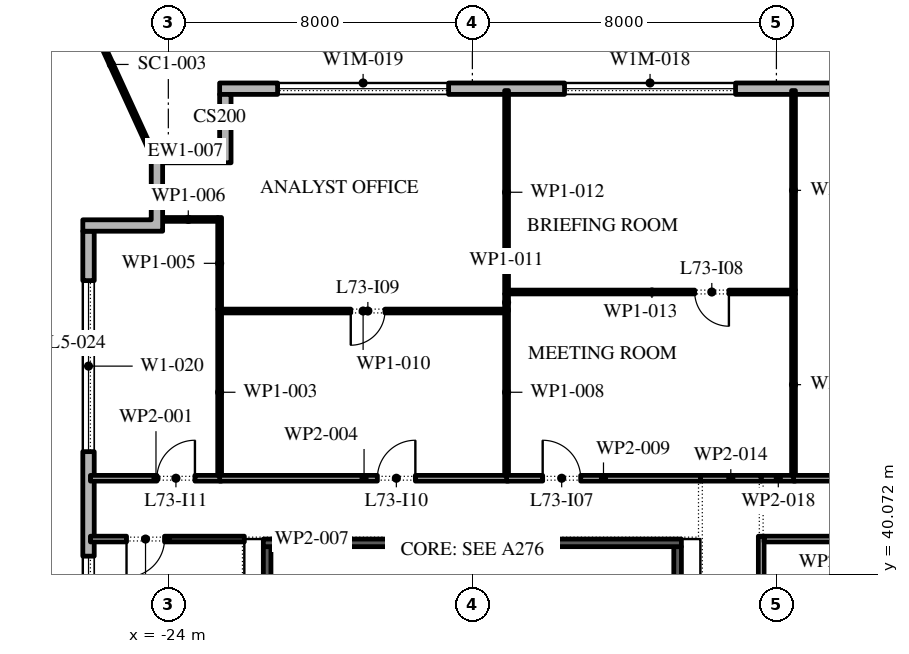
"""IFC4 building model, lengths in metres.
Left out: names, types, materials, properties, quantities, classifications, styles, units other than length and angle.
Written with IfcOpenShell. Run it as: python <this file> out.ifc"""

import sys

from ifc_helpers import new_model, si_unit, direction, frame, frame_2d, origin, place, context, subcontext, project, spatial, polyline, rectangle, outline, extrude, element, fill, save


model = new_model("IFC4")
c1 = context("Model", 3, precision=1e-05, world=origin(), true_north=direction((0.0, 1.0)))
c2 = subcontext(c1, "Body", "Model", "MODEL_VIEW")
j1 = project(units=[si_unit("LENGTHUNIT", "METRE"), si_unit("PLANEANGLEUNIT", "RADIAN")], contexts=[c1])
p1 = place(None, origin())
s1 = spatial("IfcSite", under=j1, at=p1, CompositionType="ELEMENT")
p2 = place(p1, origin())
s2 = spatial("IfcBuilding", under=s1, at=p2, CompositionType="ELEMENT")
p3 = place(p2, frame((0.0, 0.0, 334.2)))
s3 = spatial("IfcBuildingStorey", under=s2, at=p3, CompositionType="ELEMENT", Elevation=334.2)
p4 = place(p3, frame((22.35, 52.85, 0.0), z_axis=(0.0, 0.0, 1.0), x_axis=(-1.0, 0.0, 0.0)))
e1 = element("IfcWall", 1, at=p4, inside=s3, PredefinedType="STANDARD", context=c2, shape_type="SweptSolid", body=[
    extrude(rectangle(XDim=45.0, YDim=0.3, at=frame_2d((22.5, 0.0))), origin(), (0.0, 0.0, 1.0), 4.0),
])
p5 = place(p4, frame((1.375, 0.0, 0.45)))
e2 = element("IfcOpeningElement", 2, at=p5, cuts=e1, PredefinedType="OPENING", context=c2, shape_type="SweptSolid", body=[
    extrude(rectangle(XDim=4.5, YDim=2.575, at=frame_2d((2.25, 1.288))), frame((0.0, 0.16, 0.0), z_axis=(0.0, -1.0, 0.0), x_axis=(1.0, 0.0, 0.0)), (0.0, 0.0, 1.0), 0.32),
])
p6 = place(p4, frame((8.775, 0.0, 0.45)))
e3 = element("IfcOpeningElement", 3, at=p6, cuts=e1, PredefinedType="OPENING", context=c2, shape_type="SweptSolid", body=[
    extrude(rectangle(XDim=4.5, YDim=2.575, at=frame_2d((2.25, 1.288))), frame((0.0, 0.16, 0.0), z_axis=(0.0, -1.0, 0.0), x_axis=(1.0, 0.0, 0.0)), (0.0, 0.0, 1.0), 0.32),
])
p7 = place(p4, frame((17.375, 0.0, 0.0)))
e4 = element("IfcOpeningElement", 4, at=p7, cuts=e1, PredefinedType="OPENING", context=c2, shape_type="SweptSolid", body=[
    extrude(rectangle(XDim=2.4, YDim=3.025, at=frame_2d((1.2, 1.512))), frame((0.0, 0.16, 0.0), z_axis=(0.0, -1.0, 0.0), x_axis=(1.0, 0.0, 0.0)), (0.0, 0.0, 1.0), 0.32),
])
p8 = place(p4, frame((23.875, 0.0, 0.45)))
e5 = element("IfcOpeningElement", 5, at=p8, cuts=e1, PredefinedType="OPENING", context=c2, shape_type="SweptSolid", body=[
    extrude(rectangle(XDim=4.5, YDim=2.575, at=frame_2d((2.25, 1.288))), frame((0.0, 0.16, 0.0), z_axis=(0.0, -1.0, 0.0), x_axis=(1.0, 0.0, 0.0)), (0.0, 0.0, 1.0), 0.32),
])
p9 = place(p4, frame((31.425, 0.0, 0.45)))
e6 = element("IfcOpeningElement", 6, at=p9, cuts=e1, PredefinedType="OPENING", context=c2, shape_type="SweptSolid", body=[
    extrude(rectangle(XDim=4.5, YDim=2.575, at=frame_2d((2.25, 1.288))), frame((0.0, 0.16, 0.0), z_axis=(0.0, -1.0, 0.0), x_axis=(1.0, 0.0, 0.0)), (0.0, 0.0, 1.0), 0.32),
])
p10 = place(p4, frame((38.975, 0.0, 0.45)))
e7 = element("IfcOpeningElement", 7, at=p10, cuts=e1, PredefinedType="OPENING", context=c2, shape_type="SweptSolid", body=[
    extrude(rectangle(XDim=4.5, YDim=2.575, at=frame_2d((2.25, 1.288))), frame((0.0, 0.16, 0.0), z_axis=(0.0, -1.0, 0.0), x_axis=(1.0, 0.0, 0.0)), (0.0, 0.0, 1.0), 0.32),
])
p11 = place(p3, frame((-26.1, 49.1, 0.0), z_axis=(0.0, 0.0, 1.0), x_axis=(0.0, -1.0, 0.0)))
e8 = element("IfcWall", 8, at=p11, inside=s3, PredefinedType="STANDARD", context=c2, shape_type="SweptSolid", body=[
    extrude(rectangle(XDim=51.5, YDim=0.3, at=frame_2d((25.75, 0.0))), origin(), (0.0, 0.0, 1.0), 4.0),
])
p12 = place(p11, frame((1.3, 0.0, 0.45)))
e9 = element("IfcOpeningElement", 9, at=p12, cuts=e8, PredefinedType="OPENING", context=c2, shape_type="SweptSolid", body=[
    extrude(rectangle(XDim=4.5, YDim=3.05, at=frame_2d((2.25, 1.525))), frame((0.0, 0.16, 0.0), z_axis=(0.0, -1.0, 0.0), x_axis=(1.0, 0.0, 0.0)), (0.0, 0.0, 1.0), 0.32),
])
p13 = place(p11, frame((8.55, 0.0, 0.45)))
e10 = element("IfcOpeningElement", 10, at=p13, cuts=e8, PredefinedType="OPENING", context=c2, shape_type="SweptSolid", body=[
    extrude(rectangle(XDim=4.5, YDim=3.05, at=frame_2d((2.25, 1.525))), frame((0.0, 0.16, 0.0), z_axis=(0.0, -1.0, 0.0), x_axis=(1.0, 0.0, 0.0)), (0.0, 0.0, 1.0), 0.32),
])
p14 = place(p11, frame((17.0, 0.0, 0.0)))
e11 = element("IfcOpeningElement", 11, at=p14, cuts=e8, PredefinedType="OPENING", context=c2, shape_type="SweptSolid", body=[
    extrude(rectangle(XDim=2.4, YDim=3.5, at=frame_2d((1.2, 1.75))), frame((0.0, 0.16, 0.0), z_axis=(0.0, -1.0, 0.0), x_axis=(1.0, 0.0, 0.0)), (0.0, 0.0, 1.0), 0.32),
])
p15 = place(p11, frame((23.35, 0.0, 0.45)))
e12 = element("IfcOpeningElement", 12, at=p15, cuts=e8, PredefinedType="OPENING", context=c2, shape_type="SweptSolid", body=[
    extrude(rectangle(XDim=4.5, YDim=3.05, at=frame_2d((2.25, 1.525))), frame((0.0, 0.16, 0.0), z_axis=(0.0, -1.0, 0.0), x_axis=(1.0, 0.0, 0.0)), (0.0, 0.0, 1.0), 0.32),
])
p16 = place(p11, frame((30.75, 0.0, 0.45)))
e13 = element("IfcOpeningElement", 13, at=p16, cuts=e8, PredefinedType="OPENING", context=c2, shape_type="SweptSolid", body=[
    extrude(rectangle(XDim=4.5, YDim=3.05, at=frame_2d((2.25, 1.525))), frame((0.0, 0.16, 0.0), z_axis=(0.0, -1.0, 0.0), x_axis=(1.0, 0.0, 0.0)), (0.0, 0.0, 1.0), 0.32),
])
p17 = place(p11, frame((38.15, 0.0, 0.45)))
e14 = element("IfcOpeningElement", 14, at=p17, cuts=e8, PredefinedType="OPENING", context=c2, shape_type="SweptSolid", body=[
    extrude(rectangle(XDim=4.5, YDim=3.05, at=frame_2d((2.25, 1.525))), frame((0.0, 0.16, 0.0), z_axis=(0.0, -1.0, 0.0), x_axis=(1.0, 0.0, 0.0)), (0.0, 0.0, 1.0), 0.32),
])
p18 = place(p11, frame((46.6, 0.0, 0.0)))
e15 = element("IfcOpeningElement", 15, at=p18, cuts=e8, PredefinedType="OPENING", context=c2, shape_type="SweptSolid", body=[
    extrude(rectangle(XDim=2.4, YDim=3.5, at=frame_2d((1.2, 1.75))), frame((0.0, 0.16, 0.0), z_axis=(0.0, -1.0, 0.0), x_axis=(1.0, 0.0, 0.0)), (0.0, 0.0, 1.0), 0.32),
])
p19 = place(p3, origin())
e16 = element("IfcWall", 16, at=p19, inside=s3, PredefinedType="STANDARD", context=c2, shape_type="SweptSolid", body=[
    extrude(outline(polyline([(-24.45, 49.4), (-24.45, 51.2), (-22.65, 51.2), (-22.65, 52.7), (-22.35, 52.7), (-22.35, 50.9), (-24.15, 50.9), (-24.15, 49.1), (-26.25, 49.1), (-26.25, 49.4), (-24.45, 49.4)])), origin(), (0.0, 0.0, 1.0), 4.0),
])
p20 = place(p3, frame((-24.45, 51.2, -0.05), z_axis=(0.0, 0.0, 1.0), x_axis=(-0.41666974254, 0.909057933056, 0.0)))
e17 = element("IfcWall", 17, at=p20, inside=s3, PredefinedType="STANDARD", context=c2, shape_type="SweptSolid", body=[
    extrude(rectangle(XDim=5.033, YDim=0.1, at=frame_2d((2.517, 0.0))), origin(), (0.0, 0.0, 1.0), 4.05),
])
p21 = place(p3, frame((-21.4, 25.75, 0.0), z_axis=(0.0, 0.0, 1.0), x_axis=(0.0, 1.0, 0.0)))
e18 = element("IfcWall", 18, at=p21, inside=s3, PredefinedType="SHEAR", context=c2, shape_type="SweptSolid", body=[
    extrude(rectangle(XDim=15.05, YDim=0.2, at=frame_2d((7.525, 0.0))), origin(), (0.0, 0.0, 1.0), 4.0),
])
p22 = place(p3, frame((-10.6, 25.75, 0.0), z_axis=(0.0, 0.0, 1.0), x_axis=(0.0, 1.0, 0.0)))
e19 = element("IfcWall", 19, at=p22, inside=s3, PredefinedType="SHEAR", context=c2, shape_type="SweptSolid", body=[
    extrude(rectangle(XDim=15.05, YDim=0.2, at=frame_2d((7.525, 0.0))), origin(), (0.0, 0.0, 1.0), 4.0),
])
p23 = place(p22, frame((7.075, 0.0, 0.0)))
e20 = element("IfcOpeningElement", 20, at=p23, cuts=e19, PredefinedType="OPENING", context=c2, shape_type="SweptSolid", body=[
    extrude(rectangle(XDim=0.9, YDim=2.1, at=frame_2d((0.45, 1.05))), frame((0.0, 0.11, 0.0), z_axis=(0.0, -1.0, 0.0), x_axis=(1.0, 0.0, 0.0)), (0.0, 0.0, 1.0), 0.22),
])
p24 = place(p3, frame((-21.5, 40.9, 0.0), z_axis=(0.0, 0.0, 1.0), x_axis=(1.0, 0.0, 0.0)))
e21 = element("IfcWall", 21, at=p24, inside=s3, PredefinedType="SHEAR", context=c2, shape_type="SweptSolid", body=[
    extrude(rectangle(XDim=11.0, YDim=0.2, at=frame_2d((5.5, 0.0))), origin(), (0.0, 0.0, 1.0), 4.0),
])
p25 = place(p3, frame((-26.05, 42.6, 0.0), z_axis=(0.0, 0.0, 1.0), x_axis=(1.0, 0.0, 0.0)))
e22 = element("IfcWall", 22, at=p25, inside=s3, PredefinedType="PARTITIONING", context=c2, shape_type="SweptSolid", body=[
    extrude(rectangle(XDim=3.45, YDim=0.15, at=frame_2d((1.725, 0.0))), origin(), (0.0, 0.0, 1.0), 4.0),
])
p26 = place(p25, frame((1.75, 0.0, 0.0)))
e23 = element("IfcOpeningElement", 23, at=p26, cuts=e22, PredefinedType="OPENING", context=c2, shape_type="SweptSolid", body=[
    extrude(rectangle(XDim=1.0, YDim=2.1, at=frame_2d((0.5, 1.05))), frame((0.0, 0.085, 0.0), z_axis=(0.0, -1.0, 0.0), x_axis=(1.0, 0.0, 0.0)), (0.0, 0.0, 1.0), 0.17),
])
p27 = place(p3, frame((-22.65, 42.675, 0.0), z_axis=(0.0, 0.0, 1.0), x_axis=(0.0, 1.0, 0.0)))
e24 = element("IfcWall", 24, at=p27, inside=s3, PredefinedType="PARTITIONING", context=c2, shape_type="SweptSolid", body=[
    extrude(rectangle(XDim=4.375, YDim=0.1, at=frame_2d((2.188, 0.0))), origin(), (0.0, 0.0, 1.0), 4.0),
])
p28 = place(p3, frame((-22.65, 42.6, 0.0), z_axis=(0.0, 0.0, 1.0), x_axis=(1.0, 0.0, 0.0)))
e25 = element("IfcWall", 25, at=p28, inside=s3, PredefinedType="PARTITIONING", context=c2, shape_type="SweptSolid", body=[
    extrude(rectangle(XDim=7.6, YDim=0.15, at=frame_2d((3.8, 0.0))), origin(), (0.0, 0.0, 1.0), 4.0),
])
p29 = place(p28, frame((4.15, 0.0, 0.0)))
e26 = element("IfcOpeningElement", 26, at=p29, cuts=e25, PredefinedType="OPENING", context=c2, shape_type="SweptSolid", body=[
    extrude(rectangle(XDim=1.0, YDim=2.1, at=frame_2d((0.5, 1.05))), frame((0.0, 0.085, 0.0), z_axis=(0.0, -1.0, 0.0), x_axis=(1.0, 0.0, 0.0)), (0.0, 0.0, 1.0), 0.17),
])
p30 = place(p3, frame((-22.65, 47.05, 0.0), z_axis=(0.0, 0.0, 1.0), x_axis=(0.0, 1.0, 0.0)))
e27 = element("IfcWall", 27, at=p30, inside=s3, PredefinedType="PARTITIONING", context=c2, shape_type="SweptSolid", body=[
    extrude(rectangle(XDim=2.41, YDim=0.1, at=frame_2d((1.205, 0.0))), origin(), (0.0, 0.0, 1.0), 4.0),
])
p31 = place(p3, frame((-22.7, 49.41, 0.0), z_axis=(0.0, 0.0, 1.0), x_axis=(-1.0, 0.0, 0.0)))
e28 = element("IfcWall", 28, at=p31, inside=s3, PredefinedType="PARTITIONING", context=c2, shape_type="SweptSolid", body=[
    extrude(rectangle(XDim=1.55, YDim=0.1, at=frame_2d((0.775, 0.0))), origin(), (0.0, 0.0, 1.0), 4.0),
])
p32 = place(p3, frame((-22.0, 41.0, 0.0), z_axis=(0.0, 0.0, 1.0), x_axis=(-1.0, 0.0, 0.0)))
e29 = element("IfcWall", 29, at=p32, inside=s3, PredefinedType="PARTITIONING", context=c2, shape_type="SweptSolid", body=[
    extrude(rectangle(XDim=4.05, YDim=0.15, at=frame_2d((2.025, 0.0))), origin(), (0.0, 0.0, 1.0), 4.0),
])
p33 = place(p32, frame((2.1, 0.0, 0.0)))
e30 = element("IfcOpeningElement", 30, at=p33, cuts=e29, PredefinedType="OPENING", context=c2, shape_type="SweptSolid", body=[
    extrude(rectangle(XDim=1.0, YDim=2.1, at=frame_2d((0.5, 1.05))), frame((0.0, 0.085, 0.0), z_axis=(0.0, -1.0, 0.0), x_axis=(1.0, 0.0, 0.0)), (0.0, 0.0, 1.0), 0.17),
])
p34 = place(p3, frame((-15.1, 42.675, 0.0), z_axis=(0.0, 0.0, 1.0), x_axis=(0.0, 1.0, 0.0)))
e31 = element("IfcWall", 31, at=p34, inside=s3, PredefinedType="PARTITIONING", context=c2, shape_type="SweptSolid", body=[
    extrude(rectangle(XDim=4.375, YDim=0.1, at=frame_2d((2.188, 0.0))), origin(), (0.0, 0.0, 1.0), 4.0),
])
p35 = place(p3, frame((-15.1, 42.6, 0.0), z_axis=(0.0, 0.0, 1.0), x_axis=(1.0, 0.0, 0.0)))
e32 = element("IfcWall", 32, at=p35, inside=s3, PredefinedType="PARTITIONING", context=c2, shape_type="SweptSolid", body=[
    extrude(rectangle(XDim=5.1, YDim=0.15, at=frame_2d((2.55, 0.0))), origin(), (0.0, 0.0, 1.0), 4.0),
])
p36 = place(p35, frame((0.95, 0.0, 0.0)))
e33 = element("IfcOpeningElement", 33, at=p36, cuts=e32, PredefinedType="OPENING", context=c2, shape_type="SweptSolid", body=[
    extrude(rectangle(XDim=1.0, YDim=2.1, at=frame_2d((0.5, 1.05))), frame((0.0, 0.085, 0.0), z_axis=(0.0, -1.0, 0.0), x_axis=(1.0, 0.0, 0.0)), (0.0, 0.0, 1.0), 0.17),
])
p37 = place(p3, frame((-15.15, 47.0, 0.0), z_axis=(0.0, 0.0, 1.0), x_axis=(-1.0, 0.0, 0.0)))
e34 = element("IfcWall", 34, at=p37, inside=s3, PredefinedType="PARTITIONING", context=c2, shape_type="SweptSolid", body=[
    extrude(rectangle(XDim=7.45, YDim=0.1, at=frame_2d((3.725, 0.0))), origin(), (0.0, 0.0, 1.0), 4.0),
])
p38 = place(p37, frame((3.15, 0.0, 0.0)))
e35 = element("IfcOpeningElement", 35, at=p38, cuts=e34, PredefinedType="OPENING", context=c2, shape_type="SweptSolid", body=[
    extrude(rectangle(XDim=0.9, YDim=2.1, at=frame_2d((0.45, 1.05))), frame((0.0, 0.06, 0.0), z_axis=(0.0, -1.0, 0.0), x_axis=(1.0, 0.0, 0.0)), (0.0, 0.0, 1.0), 0.12),
])
p39 = place(p3, frame((-15.1, 47.0, 0.0), z_axis=(0.0, 0.0, 1.0), x_axis=(0.0, 1.0, 0.0)))
e36 = element("IfcWall", 36, at=p39, inside=s3, PredefinedType="PARTITIONING", context=c2, shape_type="SweptSolid", body=[
    extrude(rectangle(XDim=0.45, YDim=0.1, at=frame_2d((0.225, 0.0))), origin(), (0.0, 0.0, 1.0), 4.0),
])
p40 = place(p3, frame((-15.1, 47.45, 0.0), z_axis=(0.0, 0.0, 1.0), x_axis=(0.0, 1.0, 0.0)))
e37 = element("IfcWall", 37, at=p40, inside=s3, PredefinedType="PARTITIONING", context=c2, shape_type="SweptSolid", body=[
    extrude(rectangle(XDim=5.35, YDim=0.1, at=frame_2d((2.675, 0.0))), origin(), (0.0, 0.0, 1.0), 4.0),
])
p41 = place(p3, frame((-15.05, 47.5, 0.0), z_axis=(0.0, 0.0, 1.0), x_axis=(1.0, 0.0, 0.0)))
e38 = element("IfcWall", 38, at=p41, inside=s3, PredefinedType="PARTITIONING", context=c2, shape_type="SweptSolid", body=[
    extrude(rectangle(XDim=7.55, YDim=0.1, at=frame_2d((3.775, 0.0))), origin(), (0.0, 0.0, 1.0), 4.0),
])
p42 = place(p41, frame((4.9, 0.0, 0.0)))
e39 = element("IfcOpeningElement", 39, at=p42, cuts=e38, PredefinedType="OPENING", context=c2, shape_type="SweptSolid", body=[
    extrude(rectangle(XDim=0.9, YDim=2.1, at=frame_2d((0.45, 1.05))), frame((0.0, 0.06, 0.0), z_axis=(0.0, -1.0, 0.0), x_axis=(1.0, 0.0, 0.0)), (0.0, 0.0, 1.0), 0.12),
])
p43 = place(p3, frame((-10.0, 42.6, 0.0), z_axis=(0.0, 0.0, 1.0), x_axis=(1.0, 0.0, 0.0)))
e40 = element("IfcWall", 40, at=p43, inside=s3, PredefinedType="PARTITIONING", context=c2, shape_type="SweptSolid", body=[
    extrude(rectangle(XDim=1.6, YDim=0.15, at=frame_2d((0.8, 0.0))), origin(), (0.0, 0.0, 1.0), 4.0),
])
p44 = place(p3, frame((-8.4, 41.075, 0.0), z_axis=(0.0, 0.0, 1.0), x_axis=(0.0, -1.0, 0.0)))
e41 = element("IfcWall", 41, at=p44, inside=s3, PredefinedType="PARTITIONING", context=c2, shape_type="SweptSolid", body=[
    extrude(rectangle(XDim=9.025, YDim=0.15, at=frame_2d((4.512, 0.0))), origin(), (0.0, 0.0, 1.0), 4.0),
])
p45 = place(p44, frame((2.175, 0.0, 0.0)))
e42 = element("IfcOpeningElement", 42, at=p45, cuts=e41, PredefinedType="OPENING", context=c2, shape_type="SweptSolid", body=[
    extrude(rectangle(XDim=1.0, YDim=2.1, at=frame_2d((0.5, 1.05))), frame((0.0, 0.085, 0.0), z_axis=(0.0, -1.0, 0.0), x_axis=(1.0, 0.0, 0.0)), (0.0, 0.0, 1.0), 0.17),
])
p46 = place(p3, frame((-8.4, 42.6, 0.0), z_axis=(0.0, 0.0, 1.0), x_axis=(1.0, 0.0, 0.0)))
e43 = element("IfcWall", 43, at=p46, inside=s3, PredefinedType="PARTITIONING", context=c2, shape_type="SweptSolid", body=[
    extrude(rectangle(XDim=0.9, YDim=0.15, at=frame_2d((0.45, 0.0))), origin(), (0.0, 0.0, 1.0), 4.0),
])
p47 = place(p3, frame((-7.55, 42.675, 0.0), z_axis=(0.0, 0.0, 1.0), x_axis=(0.0, 1.0, 0.0)))
e44 = element("IfcWall", 44, at=p47, inside=s3, PredefinedType="PARTITIONING", context=c2, shape_type="SweptSolid", body=[
    extrude(rectangle(XDim=4.775, YDim=0.1, at=frame_2d((2.387, 0.0))), origin(), (0.0, 0.0, 1.0), 3.164),
])
p48 = place(p3, frame((-7.55, 42.6, 0.0), z_axis=(0.0, 0.0, 1.0), x_axis=(1.0, 0.0, 0.0)))
e45 = element("IfcWall", 45, at=p48, inside=s3, PredefinedType="PARTITIONING", context=c2, shape_type="SweptSolid", body=[
    extrude(rectangle(XDim=7.5, YDim=0.15, at=frame_2d((3.75, 0.0))), origin(), (0.0, 0.0, 1.0), 4.0),
])
p49 = place(p48, frame((1.65, 0.0, 0.0)))
e46 = element("IfcOpeningElement", 46, at=p49, cuts=e45, PredefinedType="OPENING", context=c2, shape_type="SweptSolid", body=[
    extrude(rectangle(XDim=1.0, YDim=2.1, at=frame_2d((0.5, 1.05))), frame((0.0, 0.085, 0.0), z_axis=(0.0, -1.0, 0.0), x_axis=(1.0, 0.0, 0.0)), (0.0, 0.0, 1.0), 0.17),
])
p50 = place(p3, frame((-7.55, 47.55, 0.0), z_axis=(0.0, 0.0, 1.0), x_axis=(0.0, 1.0, 0.0)))
e47 = element("IfcWall", 47, at=p50, inside=s3, PredefinedType="PARTITIONING", context=c2, shape_type="SweptSolid", body=[
    extrude(rectangle(XDim=5.25, YDim=0.1, at=frame_2d((2.625, 0.0))), origin(), (0.0, 0.0, 1.0), 3.164),
])
p51 = place(p3, frame((-4.55, 41.0, 0.0), z_axis=(0.0, 0.0, 1.0), x_axis=(-1.0, 0.0, 0.0)))
e48 = element("IfcWall", 48, at=p51, inside=s3, PredefinedType="PARTITIONING", context=c2, shape_type="SweptSolid", body=[
    extrude(rectangle(XDim=3.775, YDim=0.15, at=frame_2d((1.887, 0.0))), origin(), (0.0, 0.0, 1.0), 4.0),
])
p52 = place(p9, origin())
e49 = element("IfcWindow", 49, at=p52, inside=s3, PartitioningType="DOUBLE_PANEL_VERTICAL", PredefinedType="WINDOW", context=c2, shape_type="SweptSolid", body=[
    extrude(rectangle(XDim=4.5, YDim=2.575, at=frame_2d((2.25, 1.288))), frame((0.0, 0.03, 0.0), z_axis=(0.0, -1.0, 0.0), x_axis=(1.0, 0.0, 0.0)), (0.0, 0.0, 1.0), 0.06),
])
fill(e6, e49)
p53 = place(p10, origin())
e50 = element("IfcWindow", 50, at=p53, inside=s3, PartitioningType="DOUBLE_PANEL_VERTICAL", PredefinedType="WINDOW", context=c2, shape_type="SweptSolid", body=[
    extrude(rectangle(XDim=4.5, YDim=2.575, at=frame_2d((2.25, 1.288))), frame((0.0, 0.03, 0.0), z_axis=(0.0, -1.0, 0.0), x_axis=(1.0, 0.0, 0.0)), (0.0, 0.0, 1.0), 0.06),
])
fill(e7, e50)
p54 = place(p12, origin())
e51 = element("IfcWindow", 51, at=p54, inside=s3, PartitioningType="DOUBLE_PANEL_VERTICAL", PredefinedType="WINDOW", context=c2, shape_type="SweptSolid", body=[
    extrude(rectangle(XDim=4.5, YDim=3.05, at=frame_2d((2.25, 1.525))), frame((0.0, 0.03, 0.0), z_axis=(0.0, -1.0, 0.0), x_axis=(1.0, 0.0, 0.0)), (0.0, 0.0, 1.0), 0.06),
])
fill(e9, e51)
p55 = place(p13, origin())
e52 = element("IfcWindow", 52, at=p55, inside=s3, PartitioningType="DOUBLE_PANEL_VERTICAL", PredefinedType="WINDOW", context=c2, shape_type="SweptSolid", body=[
    extrude(rectangle(XDim=4.5, YDim=3.05, at=frame_2d((2.25, 1.525))), frame((0.0, 0.03, 0.0), z_axis=(0.0, -1.0, 0.0), x_axis=(1.0, 0.0, 0.0)), (0.0, 0.0, 1.0), 0.06),
])
fill(e10, e52)
p56 = place(p36, origin())
e53 = element("IfcDoor", 53, at=p56, inside=s3, OperationType="SINGLE_SWING_RIGHT", PredefinedType="DOOR", context=c2, shape_type="SweptSolid", body=[
    extrude(rectangle(XDim=1.0, YDim=2.1, at=frame_2d((0.5, 1.05))), frame((0.0, 0.025, 0.0), z_axis=(0.0, -1.0, 0.0), x_axis=(1.0, 0.0, 0.0)), (0.0, 0.0, 1.0), 0.05),
])
fill(e33, e53)
p57 = place(p42, frame((0.9, 0.0, 0.0), z_axis=(0.0, 0.0, 1.0), x_axis=(-1.0, 0.0, 0.0)))
e54 = element("IfcDoor", 54, at=p57, inside=s3, OperationType="SINGLE_SWING_RIGHT", PredefinedType="DOOR", context=c2, shape_type="SweptSolid", body=[
    extrude(rectangle(XDim=0.9, YDim=2.1, at=frame_2d((0.45, 1.05))), frame((0.0, 0.025, 0.0), z_axis=(0.0, -1.0, 0.0), x_axis=(1.0, 0.0, 0.0)), (0.0, 0.0, 1.0), 0.05),
])
fill(e39, e54)
p58 = place(p38, origin())
e55 = element("IfcDoor", 55, at=p58, inside=s3, OperationType="SINGLE_SWING_LEFT", PredefinedType="DOOR", context=c2, shape_type="SweptSolid", body=[
    extrude(rectangle(XDim=0.9, YDim=2.1, at=frame_2d((0.45, 1.05))), frame((0.0, 0.025, 0.0), z_axis=(0.0, -1.0, 0.0), x_axis=(1.0, 0.0, 0.0)), (0.0, 0.0, 1.0), 0.05),
])
fill(e35, e55)
p59 = place(p29, origin())
e56 = element("IfcDoor", 56, at=p59, inside=s3, OperationType="SINGLE_SWING_LEFT", PredefinedType="DOOR", context=c2, shape_type="SweptSolid", body=[
    extrude(rectangle(XDim=1.0, YDim=2.1, at=frame_2d((0.5, 1.05))), frame((0.0, 0.025, 0.0), z_axis=(0.0, -1.0, 0.0), x_axis=(1.0, 0.0, 0.0)), (0.0, 0.0, 1.0), 0.05),
])
fill(e26, e56)
p60 = place(p26, origin())
e57 = element("IfcDoor", 57, at=p60, inside=s3, OperationType="SINGLE_SWING_LEFT", PredefinedType="DOOR", context=c2, shape_type="SweptSolid", body=[
    extrude(rectangle(XDim=1.0, YDim=2.1, at=frame_2d((0.5, 1.05))), frame((0.0, 0.025, 0.0), z_axis=(0.0, -1.0, 0.0), x_axis=(1.0, 0.0, 0.0)), (0.0, 0.0, 1.0), 0.05),
])
fill(e23, e57)
p61 = place(p33, origin())
e58 = element("IfcDoor", 58, at=p61, inside=s3, OperationType="SINGLE_SWING_LEFT", PredefinedType="DOOR", context=c2, shape_type="SweptSolid", body=[
    extrude(rectangle(XDim=1.0, YDim=2.1, at=frame_2d((0.5, 1.05))), frame((0.0, 0.025, 0.0), z_axis=(0.0, -1.0, 0.0), x_axis=(1.0, 0.0, 0.0)), (0.0, 0.0, 1.0), 0.05),
])
fill(e30, e58)
save(model, sys.argv[1])
